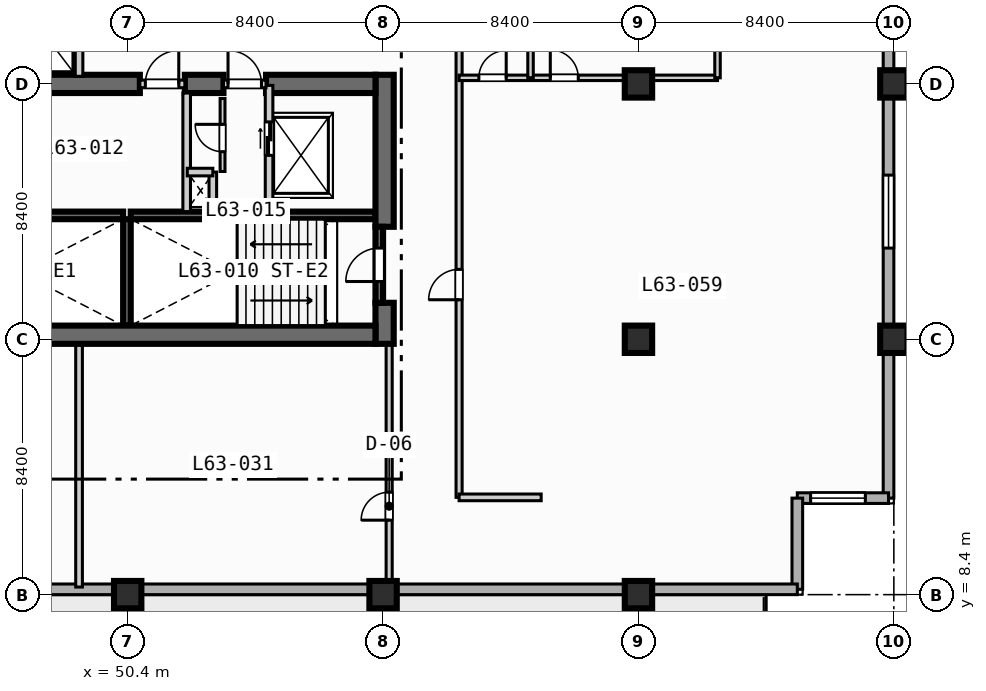
"""IFC4 building model, lengths in metres.
Left out: names, types, materials, properties, quantities, classifications, styles, units other than length and angle.
Written with IfcOpenShell. Run it as: python <this file> out.ifc"""

import sys

from ifc_helpers import new_model, si_unit, direction, frame, frame_2d, origin, origin_2d, place, context, subcontext, project, spatial, rectangle, extrude, element, fill, save


model = new_model("IFC4")
c1 = context("Model", 3, precision=1e-05, world=origin(), true_north=direction((0.0, 1.0)))
c2 = subcontext(c1, "Body", "Model", "MODEL_VIEW")
j1 = project(units=[si_unit("LENGTHUNIT", "METRE"), si_unit("PLANEANGLEUNIT", "RADIAN")], contexts=[c1])
p1 = place(None, origin())
s1 = spatial("IfcSite", under=j1, at=p1, CompositionType="ELEMENT")
p2 = place(p1, origin())
s2 = spatial("IfcBuilding", under=s1, at=p2, CompositionType="ELEMENT")
p3 = place(p2, frame((0.0, 0.0, 256.4)))
s3 = spatial("IfcBuildingStorey", under=s2, at=p3, CompositionType="ELEMENT", Elevation=256.4)
for number, where, z_axis, x_axis in (
    (1, (42.2, 20.875, 0.0), (0.0, 0.0, 1.0), (1.0, 0.0, 0.0)),
    (2, (50.5, 20.875, 0.0), (0.0, 0.0, 1.0), (1.0, 0.0, 0.0)),
):
    element("IfcWall", number, at=place(p3, frame(where, z_axis=z_axis, x_axis=x_axis)), inside=s3, PredefinedType="SOLIDWALL", context=c2, shape_type="SweptSolid", body=[
        extrude(rectangle(XDim=8.05, YDim=0.25, at=frame_2d((4.025, 0.0))), origin(), (0.0, 0.0, 1.0), 3.47),
    ])
p4 = place(p3, frame((50.375, 17.25, 0.0), z_axis=(0.0, 0.0, 1.0), x_axis=(0.0, 1.0, 0.0)))
e3 = element("IfcWall", 3, at=p4, inside=s3, PredefinedType="SOLIDWALL", context=c2, shape_type="SweptSolid", body=[
    extrude(rectangle(XDim=3.5, YDim=0.25, at=frame_2d((1.75, 0.0))), origin(), (0.0, 0.0, 1.0), 3.47),
])
p5 = place(p3, frame((58.85, 16.65, 0.0), z_axis=(0.0, 0.0, 1.0), x_axis=(0.0, 1.0, 0.0)))
e4 = element("IfcWall", 4, at=p5, inside=s3, PredefinedType="SHEAR", context=c2, shape_type="SweptSolid", body=[
    extrude(rectangle(XDim=1.35, YDim=0.6, at=frame_2d((0.675, 0.0))), origin(), (0.0, 0.0, 1.0), 3.47),
])
p6 = place(p3, frame((58.85, 20.5, 0.0), z_axis=(0.0, 0.0, 1.0), x_axis=(0.0, 1.0, 0.0)))
e5 = element("IfcWall", 5, at=p6, inside=s3, PredefinedType="SHEAR", context=c2, shape_type="SweptSolid", body=[
    extrude(rectangle(XDim=5.0, YDim=0.6, at=frame_2d((2.5, 0.0))), origin(), (0.0, 0.0, 1.0), 3.47),
])
p7 = place(p3, frame((42.2, 16.95, 0.0), z_axis=(0.0, 0.0, 1.0), x_axis=(1.0, 0.0, 0.0)))
e6 = element("IfcWall", 6, at=p7, inside=s3, PredefinedType="SHEAR", context=c2, shape_type="SweptSolid", body=[
    extrude(rectangle(XDim=16.35, YDim=0.6, at=frame_2d((8.175, 0.0))), origin(), (0.0, 0.0, 1.0), 3.47),
])
p8 = place(p3, frame((42.2, 25.2, 0.0), z_axis=(0.0, 0.0, 1.0), x_axis=(1.0, 0.0, 0.0)))
e7 = element("IfcWall", 7, at=p8, inside=s3, PredefinedType="SHEAR", context=c2, shape_type="SweptSolid", body=[
    extrude(rectangle(XDim=8.6, YDim=0.6, at=frame_2d((4.3, 0.0))), origin(), (0.0, 0.0, 1.0), 3.47),
])
p9 = place(p3, frame((52.28, 25.2, 0.0), z_axis=(0.0, 0.0, 1.0), x_axis=(1.0, 0.0, 0.0)))
e8 = element("IfcWall", 8, at=p9, inside=s3, PredefinedType="SHEAR", context=c2, shape_type="SweptSolid", body=[
    extrude(rectangle(XDim=1.27, YDim=0.6, at=frame_2d((0.635, 0.0))), origin(), (0.0, 0.0, 1.0), 3.47),
])
p10 = place(p3, frame((54.95, 25.2, 0.0), z_axis=(0.0, 0.0, 1.0), x_axis=(1.0, 0.0, 0.0)))
e9 = element("IfcWall", 9, at=p10, inside=s3, PredefinedType="SHEAR", context=c2, shape_type="SweptSolid", body=[
    extrude(rectangle(XDim=3.6, YDim=0.6, at=frame_2d((1.8, 0.0))), origin(), (0.0, 0.0, 1.0), 3.47),
])
for number, where, z_axis, x_axis in (
    (10, (50.4, 8.4, 0.0), (0.0, 0.0, 1.0), (1.0, 0.0, 0.0)),
    (11, (58.8, 8.4, 0.0), (0.0, 0.0, 1.0), (1.0, 0.0, 0.0)),
    (12, (67.2, 8.4, 0.0), (0.0, 0.0, 1.0), (1.0, 0.0, 0.0)),
    (13, (67.2, 16.8, 0.0), (0.0, 0.0, 1.0), (1.0, 0.0, 0.0)),
    (14, (67.2, 25.2, 0.0), (0.0, 0.0, 1.0), (1.0, 0.0, 0.0)),
    (15, (75.6, 16.8, 0.0), (0.0, 0.0, 1.0), (1.0, 0.0, 0.0)),
    (16, (75.6, 25.2, 0.0), (0.0, 0.0, 1.0), (1.0, 0.0, 0.0)),
):
    element("IfcColumn", number, at=place(p3, frame(where, z_axis=z_axis, x_axis=x_axis)), inside=s3, PredefinedType="COLUMN", context=c2, shape_type="SweptSolid", body=[
        extrude(rectangle(XDim=0.9, YDim=0.9, at=origin_2d()), origin(), (0.0, 0.0, 1.0), 3.7),
    ])
p11 = place(p3, frame((75.425, 30.425, 0.0), z_axis=(0.0, 0.0, 1.0), x_axis=(0.0, -1.0, 0.0)))
e17 = element("IfcWall", 17, at=p11, inside=s3, PredefinedType="STANDARD", context=c2, shape_type="SweptSolid", body=[
    extrude(rectangle(XDim=18.85, YDim=0.35, at=frame_2d((9.425, 0.0))), origin(), (0.0, 0.0, 1.0), 3.47),
])
p12 = place(p11, frame((8.225, 0.0, 0.85)))
e18 = element("IfcOpeningElement", 18, at=p12, cuts=e17, PredefinedType="OPENING", context=c2, shape_type="SweptSolid", body=[
    extrude(rectangle(XDim=2.4, YDim=1.95, at=frame_2d((1.2, 0.975))), frame((0.0, 0.185, 0.0), z_axis=(0.0, -1.0, 0.0), x_axis=(1.0, 0.0, 0.0)), (0.0, 0.0, 1.0), 0.37),
])
p13 = place(p3, frame((75.425, 11.575, 0.0), z_axis=(0.0, 0.0, 1.0), x_axis=(-1.0, 0.0, 0.0)))
e19 = element("IfcWall", 19, at=p13, inside=s3, PredefinedType="STANDARD", context=c2, shape_type="SweptSolid", body=[
    extrude(rectangle(XDim=3.0, YDim=0.35, at=frame_2d((1.5, 0.0))), origin(), (0.0, 0.0, 1.0), 3.47),
])
p14 = place(p13, frame((0.762, 0.0, 0.85)))
e20 = element("IfcOpeningElement", 20, at=p14, cuts=e19, PredefinedType="OPENING", context=c2, shape_type="SweptSolid", body=[
    extrude(rectangle(XDim=1.8, YDim=1.8, at=frame_2d((0.9, 0.9))), frame((0.0, 0.185, 0.0), z_axis=(0.0, -1.0, 0.0), x_axis=(1.0, 0.0, 0.0)), (0.0, 0.0, 1.0), 0.37),
])
p15 = place(p3, frame((72.425, 11.575, 0.0), z_axis=(0.0, 0.0, 1.0), x_axis=(0.0, -1.0, 0.0)))
e21 = element("IfcWall", 21, at=p15, inside=s3, PredefinedType="STANDARD", context=c2, shape_type="SweptSolid", body=[
    extrude(rectangle(XDim=3.0, YDim=0.35, at=frame_2d((1.5, 0.0))), origin(), (0.0, 0.0, 1.0), 3.47),
])
p16 = place(p3, frame((72.425, 8.575, 0.0), z_axis=(0.0, 0.0, 1.0), x_axis=(-1.0, 0.0, 0.0)))
e22 = element("IfcWall", 22, at=p16, inside=s3, PredefinedType="STANDARD", context=c2, shape_type="SweptSolid", body=[
    extrude(rectangle(XDim=60.85, YDim=0.35, at=frame_2d((30.425, 0.0))), origin(), (0.0, 0.0, 1.0), 3.47),
])
p17 = place(p16, frame((41.325, 0.0, 0.0)))
e23 = element("IfcOpeningElement", 23, at=p17, cuts=e22, PredefinedType="OPENING", context=c2, shape_type="SweptSolid", body=[
    extrude(rectangle(XDim=1.4, YDim=2.2, at=frame_2d((0.7, 1.1))), frame((0.0, 0.185, 0.0), z_axis=(0.0, -1.0, 0.0), x_axis=(1.0, 0.0, 0.0)), (0.0, 0.0, 1.0), 0.37),
])
p18 = place(p16, frame((50.225, 0.0, 0.85)))
e24 = element("IfcOpeningElement", 24, at=p18, cuts=e22, PredefinedType="OPENING", context=c2, shape_type="SweptSolid", body=[
    extrude(rectangle(XDim=2.4, YDim=1.95, at=frame_2d((1.2, 0.975))), frame((0.0, 0.185, 0.0), z_axis=(0.0, -1.0, 0.0), x_axis=(1.0, 0.0, 0.0)), (0.0, 0.0, 1.0), 0.37),
])
p19 = place(p16, frame((33.425, 0.0, 0.85)))
e25 = element("IfcOpeningElement", 25, at=p19, cuts=e22, PredefinedType="OPENING", context=c2, shape_type="SweptSolid", body=[
    extrude(rectangle(XDim=2.4, YDim=1.95, at=frame_2d((1.2, 0.975))), frame((0.0, 0.185, 0.0), z_axis=(0.0, -1.0, 0.0), x_axis=(1.0, 0.0, 0.0)), (0.0, 0.0, 1.0), 0.37),
])
p20 = place(p16, frame((25.325, 0.0, 0.85)))
e26 = element("IfcOpeningElement", 26, at=p20, cuts=e22, PredefinedType="OPENING", context=c2, shape_type="SweptSolid", body=[
    extrude(rectangle(XDim=1.8, YDim=1.8, at=frame_2d((0.9, 0.9))), frame((0.0, 0.185, 0.0), z_axis=(0.0, -1.0, 0.0), x_axis=(1.0, 0.0, 0.0)), (0.0, 0.0, 1.0), 0.37),
])
p21 = place(p16, frame((58.15, 0.0, 0.85)))
e27 = element("IfcOpeningElement", 27, at=p21, cuts=e22, PredefinedType="OPENING", context=c2, shape_type="SweptSolid", body=[
    extrude(rectangle(XDim=1.8, YDim=1.8, at=frame_2d((0.9, 0.9))), frame((0.0, 0.185, 0.0), z_axis=(0.0, -1.0, 0.0), x_axis=(1.0, 0.0, 0.0)), (0.0, 0.0, 1.0), 0.37),
])
p22 = place(p16, frame((56.29, 0.0, 0.85)))
e28 = element("IfcOpeningElement", 28, at=p22, cuts=e22, PredefinedType="OPENING", context=c2, shape_type="SweptSolid", body=[
    extrude(rectangle(XDim=0.72, YDim=1.8, at=frame_2d((0.36, 0.9))), frame((0.0, 0.185, 0.0), z_axis=(0.0, -1.0, 0.0), x_axis=(1.0, 0.0, 0.0)), (0.0, 0.0, 1.0), 0.37),
])
p23 = place(p16, frame((44.15, 0.0, 0.85)))
e29 = element("IfcOpeningElement", 29, at=p23, cuts=e22, PredefinedType="OPENING", context=c2, shape_type="SweptSolid", body=[
    extrude(rectangle(XDim=1.8, YDim=1.8, at=frame_2d((0.9, 0.9))), frame((0.0, 0.185, 0.0), z_axis=(0.0, -1.0, 0.0), x_axis=(1.0, 0.0, 0.0)), (0.0, 0.0, 1.0), 0.37),
])
p24 = place(p3, frame((58.675, 18.0, 0.0), z_axis=(0.0, 0.0, 1.0), x_axis=(0.0, 1.0, 0.0)))
e30 = element("IfcWall", 30, at=p24, inside=s3, PredefinedType="SOLIDWALL", context=c2, shape_type="SweptSolid", body=[
    extrude(rectangle(XDim=2.5, YDim=0.25, at=frame_2d((1.25, 0.0))), origin(), (0.0, 0.0, 1.0), 3.47),
])
p25 = place(p24, frame((0.7, 0.0, 0.0)))
e31 = element("IfcOpeningElement", 31, at=p25, cuts=e30, PredefinedType="OPENING", context=c2, shape_type="SweptSolid", body=[
    extrude(rectangle(XDim=1.1, YDim=2.15, at=frame_2d((0.55, 1.075))), frame((0.0, 0.135, 0.0), z_axis=(0.0, -1.0, 0.0), x_axis=(1.0, 0.0, 0.0)), (0.0, 0.0, 1.0), 0.27),
])
p26 = place(p3, frame((50.8, 25.2, 0.0), z_axis=(0.0, 0.0, 1.0), x_axis=(1.0, 0.0, 0.0)))
e32 = element("IfcWall", 32, at=p26, inside=s3, PredefinedType="SOLIDWALL", context=c2, shape_type="SweptSolid", body=[
    extrude(rectangle(XDim=1.48, YDim=0.25, at=frame_2d((0.74, 0.0))), origin(), (0.0, 0.0, 1.0), 3.47),
])
p27 = place(p26, frame((0.18, 0.0, 0.0)))
e33 = element("IfcOpeningElement", 33, at=p27, cuts=e32, PredefinedType="OPENING", context=c2, shape_type="SweptSolid", body=[
    extrude(rectangle(XDim=1.1, YDim=2.15, at=frame_2d((0.55, 1.075))), frame((0.0, 0.135, 0.0), z_axis=(0.0, -1.0, 0.0), x_axis=(1.0, 0.0, 0.0)), (0.0, 0.0, 1.0), 0.27),
])
p28 = place(p3, frame((52.34, 21.0, 0.0), z_axis=(0.0, 0.0, 1.0), x_axis=(0.0, 1.0, 0.0)))
e34 = element("IfcWall", 34, at=p28, inside=s3, PredefinedType="SOLIDWALL", context=c2, shape_type="SweptSolid", body=[
    extrude(rectangle(XDim=3.9, YDim=0.25, at=frame_2d((1.95, 0.0))), origin(), (0.0, 0.0, 1.0), 3.47),
])
p29 = place(p3, frame((55.05, 21.0, 0.0), z_axis=(0.0, 0.0, 1.0), x_axis=(0.0, 1.0, 0.0)))
e35 = element("IfcWall", 35, at=p29, inside=s3, PredefinedType="SOLIDWALL", context=c2, shape_type="SweptSolid", body=[
    extrude(rectangle(XDim=4.15, YDim=0.25, at=frame_2d((2.075, 0.0))), origin(), (0.0, 0.0, 1.0), 3.47),
])
p30 = place(p29, frame((1.85, 0.0, 0.0)))
e36 = element("IfcOpeningElement", 36, at=p30, cuts=e35, PredefinedType="OPENING", context=c2, shape_type="SweptSolid", body=[
    extrude(rectangle(XDim=1.1, YDim=2.15, at=frame_2d((0.55, 1.075))), frame((0.0, 0.135, 0.0), z_axis=(0.0, -1.0, 0.0), x_axis=(1.0, 0.0, 0.0)), (0.0, 0.0, 1.0), 0.27),
])
p31 = place(p3, frame((53.55, 25.2, 0.0), z_axis=(0.0, 0.0, 1.0), x_axis=(1.0, 0.0, 0.0)))
e37 = element("IfcWall", 37, at=p31, inside=s3, PredefinedType="SOLIDWALL", context=c2, shape_type="SweptSolid", body=[
    extrude(rectangle(XDim=1.4, YDim=0.25, at=frame_2d((0.7, 0.0))), origin(), (0.0, 0.0, 1.0), 3.47),
])
p32 = place(p31, frame((0.15, 0.0, 0.0)))
e38 = element("IfcOpeningElement", 38, at=p32, cuts=e37, PredefinedType="OPENING", context=c2, shape_type="SweptSolid", body=[
    extrude(rectangle(XDim=1.1, YDim=2.15, at=frame_2d((0.55, 1.075))), frame((0.0, 0.135, 0.0), z_axis=(0.0, -1.0, 0.0), x_axis=(1.0, 0.0, 0.0)), (0.0, 0.0, 1.0), 0.27),
])
p33 = place(p3, frame((53.2, 21.0, 0.0), z_axis=(0.0, 0.0, 1.0), x_axis=(0.0, 1.0, 0.0)))
e39 = element("IfcWall", 39, at=p33, inside=s3, PredefinedType="SOLIDWALL", context=c2, shape_type="SweptSolid", body=[
    extrude(rectangle(XDim=1.3, YDim=0.25, at=frame_2d((0.65, 0.0))), origin(), (0.0, 0.0, 1.0), 3.47),
])
p34 = place(p3, frame((52.36, 22.3, 0.0), z_axis=(0.0, 0.0, 1.0), x_axis=(1.0, 0.0, 0.0)))
e40 = element("IfcWall", 40, at=p34, inside=s3, PredefinedType="SOLIDWALL", context=c2, shape_type="SweptSolid", body=[
    extrude(rectangle(XDim=0.84, YDim=0.25, at=frame_2d((0.42, 0.0))), origin(), (0.0, 0.0, 1.0), 3.47),
])
p35 = place(p3, frame((53.52, 22.32, 0.0), z_axis=(0.0, 0.0, 1.0), x_axis=(0.0, 1.0, 0.0)))
e41 = element("IfcWall", 41, at=p35, inside=s3, PredefinedType="PARTITIONING", context=c2, shape_type="SweptSolid", body=[
    extrude(rectangle(XDim=2.4, YDim=0.16, at=frame_2d((1.2, 0.0))), origin(), (0.0, 0.0, 1.0), 3.47),
])
p36 = place(p35, frame((0.65, 0.0, 0.0)))
e42 = element("IfcOpeningElement", 42, at=p36, cuts=e41, PredefinedType="OPENING", context=c2, shape_type="SweptSolid", body=[
    extrude(rectangle(XDim=0.9, YDim=2.1, at=frame_2d((0.45, 1.05))), frame((0.0, 0.09, 0.0), z_axis=(0.0, -1.0, 0.0), x_axis=(1.0, 0.0, 0.0)), (0.0, 0.0, 1.0), 0.18),
])
p37 = place(p3, frame((48.8, 25.45, 0.0), z_axis=(0.0, 0.0, 1.0), x_axis=(0.0, 1.0, 0.0)))
e43 = element("IfcWall", 43, at=p37, inside=s3, PredefinedType="SOLIDWALL", context=c2, shape_type="SweptSolid", body=[
    extrude(rectangle(XDim=2.325, YDim=0.25, at=frame_2d((1.163, 0.0))), origin(), (0.0, 0.0, 1.0), 3.47),
])
p38 = place(p3, frame((59.0, 8.65, 0.0), z_axis=(0.0, 0.0, 1.0), x_axis=(0.0, 1.0, 0.0)))
e44 = element("IfcWall", 44, at=p38, inside=s3, PredefinedType="PARTITIONING", context=c2, shape_type="SweptSolid", body=[
    extrude(rectangle(XDim=7.95, YDim=0.2, at=frame_2d((3.975, 0.0))), origin(), (0.0, 0.0, 1.0), 2.82),
])
p39 = place(p38, frame((2.2, 0.0, 0.0)))
e45 = element("IfcOpeningElement", 45, at=p39, cuts=e44, PredefinedType="OPENING", context=c2, shape_type="SweptSolid", body=[
    extrude(rectangle(XDim=0.92, YDim=2.1, at=frame_2d((0.46, 1.05))), frame((0.0, 0.11, 0.0), z_axis=(0.0, -1.0, 0.0), x_axis=(1.0, 0.0, 0.0)), (0.0, 0.0, 1.0), 0.22),
])
p40 = place(p3, frame((48.8, 8.65, 0.0), z_axis=(0.0, 0.0, 1.0), x_axis=(0.0, 1.0, 0.0)))
e46 = element("IfcWall", 46, at=p40, inside=s3, PredefinedType="PARTITIONING", context=c2, shape_type="SweptSolid", body=[
    extrude(rectangle(XDim=7.95, YDim=0.22, at=frame_2d((3.975, 0.0))), origin(), (0.0, 0.0, 1.0), 3.47),
])
p41 = place(p3, frame((61.3, 11.6, 0.0), z_axis=(0.0, 0.0, 1.0), x_axis=(0.0, 1.0, 0.0)))
e47 = element("IfcWall", 47, at=p41, inside=s3, PredefinedType="PARTITIONING", context=c2, shape_type="SweptSolid", body=[
    extrude(rectangle(XDim=18.8, YDim=0.2, at=frame_2d((9.4, 0.0))), origin(), (0.0, 0.0, 1.0), 3.47),
])
p42 = place(p41, frame((6.5, 0.0, 0.0)))
e48 = element("IfcOpeningElement", 48, at=p42, cuts=e47, PredefinedType="OPENING", context=c2, shape_type="SweptSolid", body=[
    extrude(rectangle(XDim=1.0, YDim=2.15, at=frame_2d((0.5, 1.075))), frame((0.0, 0.11, 0.0), z_axis=(0.0, -1.0, 0.0), x_axis=(1.0, 0.0, 0.0)), (0.0, 0.0, 1.0), 0.22),
])
p43 = place(p3, frame((61.3, 25.4, 0.0), z_axis=(0.0, 0.0, 1.0), x_axis=(1.0, 0.0, 0.0)))
e49 = element("IfcWall", 49, at=p43, inside=s3, PredefinedType="PLUMBINGWALL", context=c2, shape_type="SweptSolid", body=[
    extrude(rectangle(XDim=8.5, YDim=0.18, at=frame_2d((4.25, 0.0))), origin(), (0.0, 0.0, 1.0), 2.82),
])
p44 = place(p43, frame((0.65, 0.0, 0.0)))
e50 = element("IfcOpeningElement", 50, at=p44, cuts=e49, PredefinedType="OPENING", context=c2, shape_type="SweptSolid", body=[
    extrude(rectangle(XDim=0.9, YDim=2.1, at=frame_2d((0.45, 1.05))), frame((0.0, 0.1, 0.0), z_axis=(0.0, -1.0, 0.0), x_axis=(1.0, 0.0, 0.0)), (0.0, 0.0, 1.0), 0.2),
])
p45 = place(p43, frame((3.0, 0.0, 0.0)))
e51 = element("IfcOpeningElement", 51, at=p45, cuts=e49, PredefinedType="OPENING", context=c2, shape_type="SweptSolid", body=[
    extrude(rectangle(XDim=0.92, YDim=2.1, at=frame_2d((0.46, 1.05))), frame((0.0, 0.1, 0.0), z_axis=(0.0, -1.0, 0.0), x_axis=(1.0, 0.0, 0.0)), (0.0, 0.0, 1.0), 0.2),
])
for number, where, z_axis, x_axis in (
    (52, (63.65, 25.4, 0.0), (0.0, 0.0, 1.0), (0.0, 1.0, 0.0)),
    (53, (69.8, 25.4, 0.0), (0.0, 0.0, 1.0), (0.0, 1.0, 0.0)),
):
    element("IfcWall", number, at=place(p3, frame(where, z_axis=z_axis, x_axis=x_axis)), inside=s3, PredefinedType="PLUMBINGWALL", context=c2, shape_type="SweptSolid", body=[
        extrude(rectangle(XDim=5.0, YDim=0.18, at=frame_2d((2.5, 0.0))), origin(), (0.0, 0.0, 1.0), 3.47),
    ])
p46 = place(p3, frame((61.3, 11.6, 0.0), z_axis=(0.0, 0.0, 1.0), x_axis=(1.0, 0.0, 0.0)))
e54 = element("IfcWall", 54, at=p46, inside=s3, PredefinedType="PARTITIONING", context=c2, shape_type="SweptSolid", body=[
    extrude(rectangle(XDim=2.7, YDim=0.22, at=frame_2d((1.35, 0.0))), origin(), (0.0, 0.0, 1.0), 3.47),
])
p47 = place(p12, origin())
e55 = element("IfcWindow", 55, at=p47, inside=s3, PartitioningType="SINGLE_PANEL", PredefinedType="WINDOW", context=c2, shape_type="SweptSolid", body=[
    extrude(rectangle(XDim=2.4, YDim=1.95, at=frame_2d((1.2, 0.975))), frame((0.0, 0.03, 0.0), z_axis=(0.0, -1.0, 0.0), x_axis=(1.0, 0.0, 0.0)), (0.0, 0.0, 1.0), 0.06),
])
fill(e18, e55)
p48 = place(p14, origin())
e56 = element("IfcWindow", 56, at=p48, inside=s3, PartitioningType="SINGLE_PANEL", PredefinedType="WINDOW", context=c2, shape_type="SweptSolid", body=[
    extrude(rectangle(XDim=1.8, YDim=1.8, at=frame_2d((0.9, 0.9))), frame((0.0, 0.03, 0.0), z_axis=(0.0, -1.0, 0.0), x_axis=(1.0, 0.0, 0.0)), (0.0, 0.0, 1.0), 0.06),
])
fill(e20, e56)
p49 = place(p25, origin())
e57 = element("IfcDoor", 57, at=p49, inside=s3, OperationType="SINGLE_SWING_LEFT", PredefinedType="DOOR", context=c2, shape_type="SweptSolid", body=[
    extrude(rectangle(XDim=1.1, YDim=2.15, at=frame_2d((0.55, 1.075))), frame((0.0, 0.025, 0.0), z_axis=(0.0, -1.0, 0.0), x_axis=(1.0, 0.0, 0.0)), (0.0, 0.0, 1.0), 0.05),
])
fill(e31, e57)
p50 = place(p27, origin())
e58 = element("IfcDoor", 58, at=p50, inside=s3, OperationType="SINGLE_SWING_RIGHT", PredefinedType="DOOR", context=c2, shape_type="SweptSolid", body=[
    extrude(rectangle(XDim=1.1, YDim=2.15, at=frame_2d((0.55, 1.075))), frame((0.0, 0.025, 0.0), z_axis=(0.0, -1.0, 0.0), x_axis=(1.0, 0.0, 0.0)), (0.0, 0.0, 1.0), 0.05),
])
fill(e33, e58)
p51 = place(p30, origin())
e59 = element("IfcDoor", 59, at=p51, inside=s3, OperationType="SLIDING_TO_LEFT", PredefinedType="DOOR", context=c2, shape_type="SweptSolid", body=[
    extrude(rectangle(XDim=1.1, YDim=2.15, at=frame_2d((0.55, 1.075))), frame((0.0, 0.025, 0.0), z_axis=(0.0, -1.0, 0.0), x_axis=(1.0, 0.0, 0.0)), (0.0, 0.0, 1.0), 0.05),
])
fill(e36, e59)
p52 = place(p32, origin())
e60 = element("IfcDoor", 60, at=p52, inside=s3, OperationType="SINGLE_SWING_LEFT", PredefinedType="DOOR", context=c2, shape_type="SweptSolid", body=[
    extrude(rectangle(XDim=1.1, YDim=2.15, at=frame_2d((0.55, 1.075))), frame((0.0, 0.025, 0.0), z_axis=(0.0, -1.0, 0.0), x_axis=(1.0, 0.0, 0.0)), (0.0, 0.0, 1.0), 0.05),
])
fill(e38, e60)
p53 = place(p36, origin())
e61 = element("IfcDoor", 61, at=p53, inside=s3, OperationType="SINGLE_SWING_RIGHT", PredefinedType="DOOR", context=c2, shape_type="SweptSolid", body=[
    extrude(rectangle(XDim=0.9, YDim=2.1, at=frame_2d((0.45, 1.05))), frame((0.0, 0.025, 0.0), z_axis=(0.0, -1.0, 0.0), x_axis=(1.0, 0.0, 0.0)), (0.0, 0.0, 1.0), 0.05),
])
fill(e42, e61)
p54 = place(p39, origin())
e62 = element("IfcDoor", 62, at=p54, inside=s3, OperationType="SINGLE_SWING_LEFT", PredefinedType="DOOR", context=c2, shape_type="SweptSolid", body=[
    extrude(rectangle(XDim=0.92, YDim=2.1, at=frame_2d((0.46, 1.05))), frame((0.0, 0.025, 0.0), z_axis=(0.0, -1.0, 0.0), x_axis=(1.0, 0.0, 0.0)), (0.0, 0.0, 1.0), 0.05),
])
fill(e45, e62)
p55 = place(p42, origin())
e63 = element("IfcDoor", 63, at=p55, inside=s3, OperationType="SINGLE_SWING_LEFT", PredefinedType="DOOR", context=c2, shape_type="SweptSolid", body=[
    extrude(rectangle(XDim=1.0, YDim=2.15, at=frame_2d((0.5, 1.075))), frame((0.0, 0.025, 0.0), z_axis=(0.0, -1.0, 0.0), x_axis=(1.0, 0.0, 0.0)), (0.0, 0.0, 1.0), 0.05),
])
fill(e48, e63)
p56 = place(p44, origin())
e64 = element("IfcDoor", 64, at=p56, inside=s3, OperationType="SINGLE_SWING_RIGHT", PredefinedType="DOOR", context=c2, shape_type="SweptSolid", body=[
    extrude(rectangle(XDim=0.9, YDim=2.1, at=frame_2d((0.45, 1.05))), frame((0.0, 0.025, 0.0), z_axis=(0.0, -1.0, 0.0), x_axis=(1.0, 0.0, 0.0)), (0.0, 0.0, 1.0), 0.05),
])
fill(e50, e64)
p57 = place(p45, origin())
e65 = element("IfcDoor", 65, at=p57, inside=s3, OperationType="SINGLE_SWING_LEFT", PredefinedType="DOOR", context=c2, shape_type="SweptSolid", body=[
    extrude(rectangle(XDim=0.92, YDim=2.1, at=frame_2d((0.46, 1.05))), frame((0.0, 0.025, 0.0), z_axis=(0.0, -1.0, 0.0), x_axis=(1.0, 0.0, 0.0)), (0.0, 0.0, 1.0), 0.05),
])
fill(e51, e65)
save(model, sys.argv[1])
